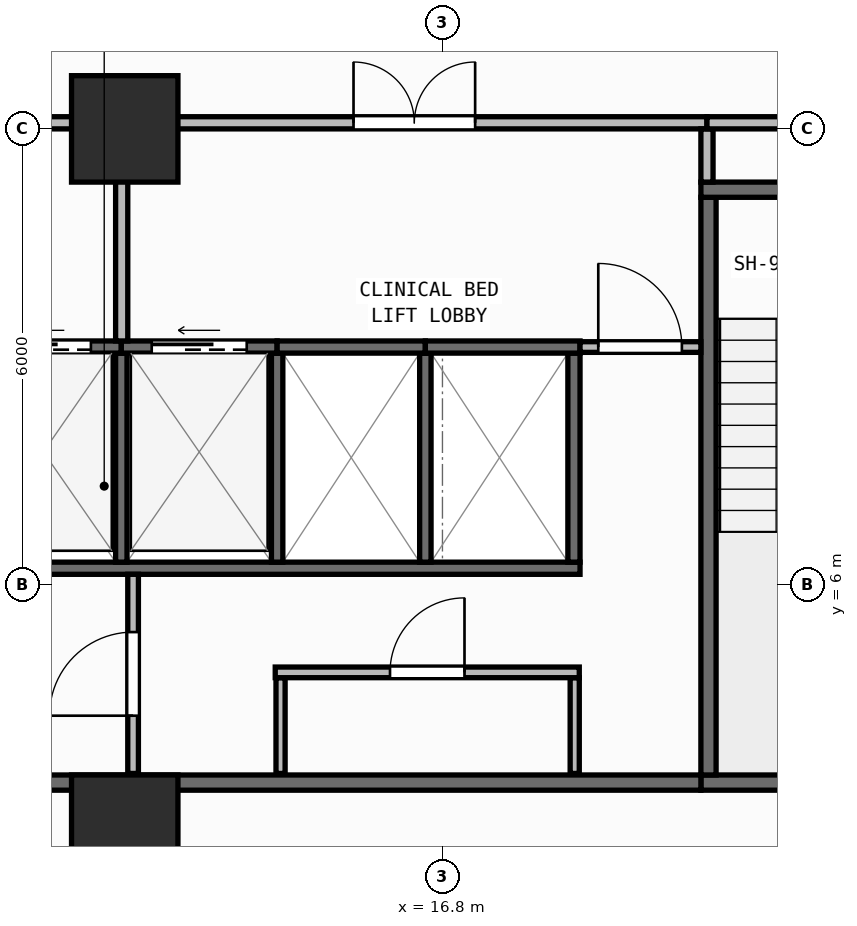
"""IFC4 building model, lengths in metres.
Left out: names, types, materials, properties, quantities, classifications, styles, units other than length and angle.
Written with IfcOpenShell. Run it as: python <this file> out.ifc"""

import sys

from ifc_helpers import new_model, si_unit, direction, frame, frame_2d, origin, origin_2d, place, context, subcontext, project, spatial, rectangle, extrude, element, fill, save


model = new_model("IFC4")
c1 = context("Model", 3, precision=1e-05, world=origin(), true_north=direction((0.0, 1.0)))
c2 = subcontext(c1, "Body", "Model", "MODEL_VIEW")
j1 = project(units=[si_unit("LENGTHUNIT", "METRE"), si_unit("PLANEANGLEUNIT", "RADIAN")], contexts=[c1])
p1 = place(None, origin())
s1 = spatial("IfcSite", under=j1, at=p1, CompositionType="ELEMENT")
p2 = place(p1, origin())
s2 = spatial("IfcBuilding", under=s1, at=p2, CompositionType="ELEMENT")
p3 = place(p2, frame((0.0, 0.0, 81.75)))
s3 = spatial("IfcBuildingStorey", under=s2, at=p3, CompositionType="ELEMENT", Elevation=81.75)
for number, where, z_axis, x_axis in (
    (1, (12.62, 2.8, 0.0), (0.0, 0.0, 1.0), (1.0, 0.0, 0.0)),
    (2, (12.62, 12.0, 0.0), (0.0, 0.0, 1.0), (1.0, 0.0, 0.0)),
):
    element("IfcColumn", number, at=place(p3, frame(where, z_axis=z_axis, x_axis=x_axis)), inside=s3, PredefinedType="COLUMN", context=c2, shape_type="SweptSolid", body=[
        extrude(rectangle(XDim=1.4, YDim=1.4, at=origin_2d()), origin(), (0.0, 0.0, 1.0), 3.95),
    ])
p4 = place(p3, frame((2.76, 0.174, 0.0), z_axis=(0.0, 0.0, 1.0), x_axis=(0.996571478456, 0.082736257641, 0.0)))
e3 = element("IfcWall", 3, at=p4, inside=s3, PredefinedType="STANDARD", context=c2, shape_type="SweptSolid", body=[
    extrude(rectangle(XDim=52.861, YDim=0.26, at=frame_2d((26.431, 0.0))), origin(), (0.0, 0.0, 1.0), 3.71),
])
p5 = place(p4, frame((25.231, 0.0, 0.9)))
e4 = element("IfcOpeningElement", 4, at=p5, cuts=e3, PredefinedType="OPENING", context=c2, shape_type="SweptSolid", body=[
    extrude(rectangle(XDim=2.4, YDim=1.65, at=frame_2d((1.2, 0.825))), frame((0.0, 0.14, 0.0), z_axis=(0.0, -1.0, 0.0), x_axis=(1.0, 0.0, 0.0)), (0.0, 0.0, 1.0), 0.28),
])
p6 = place(p3, frame((20.2, 3.4, 0.0), z_axis=(0.0, 0.0, 1.0), x_axis=(1.0, 0.0, 0.0)))
e5 = element("IfcWall", 5, at=p6, inside=s3, PredefinedType="SHEAR", context=c2, shape_type="SweptSolid", body=[
    extrude(rectangle(XDim=3.7, YDim=0.2, at=frame_2d((1.85, 0.0))), origin(), (0.0, 0.0, 1.0), 3.71),
])
p7 = place(p3, frame((20.3, 3.5, 0.0), z_axis=(0.0, 0.0, 1.0), x_axis=(0.0, 1.0, 0.0)))
e6 = element("IfcWall", 6, at=p7, inside=s3, PredefinedType="SHEAR", context=c2, shape_type="SweptSolid", body=[
    extrude(rectangle(XDim=7.6, YDim=0.2, at=frame_2d((3.8, 0.0))), origin(), (0.0, 0.0, 1.0), 3.71),
])
p8 = place(p3, frame((20.2, 11.2, 0.0), z_axis=(0.0, 0.0, 1.0), x_axis=(1.0, 0.0, 0.0)))
e7 = element("IfcWall", 7, at=p8, inside=s3, PredefinedType="SHEAR", context=c2, shape_type="SweptSolid", body=[
    extrude(rectangle(XDim=3.7, YDim=0.2, at=frame_2d((1.85, 0.0))), origin(), (0.0, 0.0, 1.0), 3.71),
])
p9 = place(p8, frame((1.2, 0.0, 0.0)))
e8 = element("IfcOpeningElement", 8, at=p9, cuts=e7, PredefinedType="OPENING", context=c2, shape_type="SweptSolid", body=[
    extrude(rectangle(XDim=1.3, YDim=2.15, at=frame_2d((0.65, 1.075))), frame((0.0, 0.11, 0.0), z_axis=(0.0, -1.0, 0.0), x_axis=(1.0, 0.0, 0.0)), (0.0, 0.0, 1.0), 0.22),
])
p10 = place(p3, frame((6.5, 3.4, 0.0), z_axis=(0.0, 0.0, 1.0), x_axis=(1.0, 0.0, 0.0)))
e9 = element("IfcWall", 9, at=p10, inside=s3, PredefinedType="SHEAR", context=c2, shape_type="SweptSolid", body=[
    extrude(rectangle(XDim=13.7, YDim=0.2, at=frame_2d((6.85, 0.0))), origin(), (0.0, 0.0, 1.0), 3.71),
])
p11 = place(p3, frame((6.5, 6.22, 0.0), z_axis=(0.0, 0.0, 1.0), x_axis=(1.0, 0.0, 0.0)))
e10 = element("IfcWall", 10, at=p11, inside=s3, PredefinedType="SHEAR", context=c2, shape_type="SweptSolid", body=[
    extrude(rectangle(XDim=12.11, YDim=0.16, at=frame_2d((6.055, 0.0))), origin(), (0.0, 0.0, 1.0), 3.71),
])
p12 = place(p3, frame((18.53, 6.3, 0.0), z_axis=(0.0, 0.0, 1.0), x_axis=(0.0, 1.0, 0.0)))
e11 = element("IfcWall", 11, at=p12, inside=s3, PredefinedType="SHEAR", context=c2, shape_type="SweptSolid", body=[
    extrude(rectangle(XDim=2.75, YDim=0.16, at=frame_2d((1.375, 0.0))), origin(), (0.0, 0.0, 1.0), 3.71),
])
for number, where, z_axis, x_axis in (
    (12, (12.575, 6.3, 0.0), (0.0, 0.0, 1.0), (0.0, 1.0, 0.0)),
    (13, (14.625, 6.3, 0.0), (0.0, 0.0, 1.0), (0.0, 1.0, 0.0)),
    (14, (16.575, 6.3, 0.0), (0.0, 0.0, 1.0), (0.0, 1.0, 0.0)),
):
    element("IfcWall", number, at=place(p3, frame(where, z_axis=z_axis, x_axis=x_axis)), inside=s3, PredefinedType="SHEAR", context=c2, shape_type="SweptSolid", body=[
        extrude(rectangle(XDim=2.75, YDim=0.15, at=frame_2d((1.375, 0.0))), origin(), (0.0, 0.0, 1.0), 3.71),
    ])
p13 = place(p3, frame((10.525, 9.13, 0.0), z_axis=(0.0, 0.0, 1.0), x_axis=(1.0, 0.0, 0.0)))
e15 = element("IfcWall", 15, at=p13, inside=s3, PredefinedType="SHEAR", context=c2, shape_type="SweptSolid", body=[
    extrude(rectangle(XDim=2.05, YDim=0.16, at=frame_2d((1.025, 0.0))), origin(), (0.0, 0.0, 1.0), 3.71),
])
p14 = place(p13, frame((0.4, 0.0, 0.0)))
e16 = element("IfcOpeningElement", 16, at=p14, cuts=e15, PredefinedType="OPENING", context=c2, shape_type="SweptSolid", body=[
    extrude(rectangle(XDim=1.25, YDim=2.15, at=frame_2d((0.625, 1.075))), frame((0.0, 0.09, 0.0), z_axis=(0.0, -1.0, 0.0), x_axis=(1.0, 0.0, 0.0)), (0.0, 0.0, 1.0), 0.18),
])
p15 = place(p3, frame((12.575, 9.13, 0.0), z_axis=(0.0, 0.0, 1.0), x_axis=(1.0, 0.0, 0.0)))
e17 = element("IfcWall", 17, at=p15, inside=s3, PredefinedType="SHEAR", context=c2, shape_type="SweptSolid", body=[
    extrude(rectangle(XDim=2.05, YDim=0.16, at=frame_2d((1.025, 0.0))), origin(), (0.0, 0.0, 1.0), 3.71),
])
p16 = place(p15, frame((0.4, 0.0, 0.0)))
e18 = element("IfcOpeningElement", 18, at=p16, cuts=e17, PredefinedType="OPENING", context=c2, shape_type="SweptSolid", body=[
    extrude(rectangle(XDim=1.25, YDim=2.15, at=frame_2d((0.625, 1.075))), frame((0.0, 0.09, 0.0), z_axis=(0.0, -1.0, 0.0), x_axis=(1.0, 0.0, 0.0)), (0.0, 0.0, 1.0), 0.18),
])
p17 = place(p3, frame((14.625, 9.13, 0.0), z_axis=(0.0, 0.0, 1.0), x_axis=(1.0, 0.0, 0.0)))
e19 = element("IfcWall", 19, at=p17, inside=s3, PredefinedType="SHEAR", context=c2, shape_type="SweptSolid", body=[
    extrude(rectangle(XDim=1.95, YDim=0.16, at=frame_2d((0.975, 0.0))), origin(), (0.0, 0.0, 1.0), 3.71),
])
p18 = place(p3, frame((16.575, 9.13, 0.0), z_axis=(0.0, 0.0, 1.0), x_axis=(1.0, 0.0, 0.0)))
e20 = element("IfcWall", 20, at=p18, inside=s3, PredefinedType="SHEAR", context=c2, shape_type="SweptSolid", body=[
    extrude(rectangle(XDim=2.035, YDim=0.16, at=frame_2d((1.018, 0.0))), origin(), (0.0, 0.0, 1.0), 3.71),
])
p19 = place(p3, frame((12.73, 3.52, 0.0), z_axis=(0.0, 0.0, 1.0), x_axis=(0.0, 1.0, 0.0)))
e21 = element("IfcWall", 21, at=p19, inside=s3, PredefinedType="PARTITIONING", context=c2, shape_type="SweptSolid", body=[
    extrude(rectangle(XDim=2.62, YDim=0.14, at=frame_2d((1.31, 0.0))), origin(), (0.0, 0.0, 1.0), 3.71),
])
p20 = place(p19, frame((0.76, 0.0, 0.0)))
e22 = element("IfcOpeningElement", 22, at=p20, cuts=e21, PredefinedType="OPENING", context=c2, shape_type="SweptSolid", body=[
    extrude(rectangle(XDim=1.1, YDim=2.1, at=frame_2d((0.55, 1.05))), frame((0.0, 0.08, 0.0), z_axis=(0.0, -1.0, 0.0), x_axis=(1.0, 0.0, 0.0)), (0.0, 0.0, 1.0), 0.16),
])
for number, where, z_axis, x_axis in (
    (23, (14.67, 3.52, 0.0), (0.0, 0.0, 1.0), (0.0, 1.0, 0.0)),
    (24, (18.54, 3.52, 0.0), (0.0, 0.0, 1.0), (0.0, 1.0, 0.0)),
):
    element("IfcWall", number, at=place(p3, frame(where, z_axis=z_axis, x_axis=x_axis)), inside=s3, PredefinedType="PARTITIONING", context=c2, shape_type="SweptSolid", body=[
        extrude(rectangle(XDim=1.26, YDim=0.12, at=frame_2d((0.63, 0.0))), origin(), (0.0, 0.0, 1.0), 3.71),
    ])
p21 = place(p3, frame((14.6, 4.85, 0.0), z_axis=(0.0, 0.0, 1.0), x_axis=(1.0, 0.0, 0.0)))
e25 = element("IfcWall", 25, at=p21, inside=s3, PredefinedType="PARTITIONING", context=c2, shape_type="SweptSolid", body=[
    extrude(rectangle(XDim=4.0, YDim=0.14, at=frame_2d((2.0, 0.0))), origin(), (0.0, 0.0, 1.0), 3.71),
])
p22 = place(p21, frame((1.51, 0.0, 0.0)))
e26 = element("IfcOpeningElement", 26, at=p22, cuts=e25, PredefinedType="OPENING", context=c2, shape_type="SweptSolid", body=[
    extrude(rectangle(XDim=0.98, YDim=2.1, at=frame_2d((0.49, 1.05))), frame((0.0, 0.08, 0.0), z_axis=(0.0, -1.0, 0.0), x_axis=(1.0, 0.0, 0.0)), (0.0, 0.0, 1.0), 0.16),
])
p23 = place(p3, frame((18.61, 9.13, 0.0), z_axis=(0.0, 0.0, 1.0), x_axis=(1.0, 0.0, 0.0)))
e27 = element("IfcWall", 27, at=p23, inside=s3, PredefinedType="PARTITIONING", context=c2, shape_type="SweptSolid", body=[
    extrude(rectangle(XDim=1.59, YDim=0.14, at=frame_2d((0.795, 0.0))), origin(), (0.0, 0.0, 1.0), 3.71),
])
p24 = place(p23, frame((0.24, 0.0, 0.0)))
e28 = element("IfcOpeningElement", 28, at=p24, cuts=e27, PredefinedType="OPENING", context=c2, shape_type="SweptSolid", body=[
    extrude(rectangle(XDim=1.1, YDim=2.1, at=frame_2d((0.55, 1.05))), frame((0.0, 0.08, 0.0), z_axis=(0.0, -1.0, 0.0), x_axis=(1.0, 0.0, 0.0)), (0.0, 0.0, 1.0), 0.16),
])
p25 = place(p3, frame((6.4, 12.08, 0.0), z_axis=(0.0, 0.0, 1.0), x_axis=(1.0, 0.0, 0.0)))
e29 = element("IfcWall", 29, at=p25, inside=s3, PredefinedType="PARTITIONING", context=c2, shape_type="SweptSolid", body=[
    extrude(rectangle(XDim=6.18, YDim=0.16, at=frame_2d((3.09, 0.0))), origin(), (0.0, 0.0, 1.0), 3.073),
])
p26 = place(p25, frame((2.29, 0.0, 0.0)))
e30 = element("IfcOpeningElement", 30, at=p26, cuts=e29, PredefinedType="OPENING", context=c2, shape_type="SweptSolid", body=[
    extrude(rectangle(XDim=1.6, YDim=2.05, at=frame_2d((0.8, 1.025))), frame((0.0, 0.09, 0.0), z_axis=(0.0, -1.0, 0.0), x_axis=(1.0, 0.0, 0.0)), (0.0, 0.0, 1.0), 0.18),
])
p27 = place(p3, frame((12.58, 9.21, 0.0), z_axis=(0.0, 0.0, 1.0), x_axis=(0.0, 1.0, 0.0)))
e31 = element("IfcWall", 31, at=p27, inside=s3, PredefinedType="PARTITIONING", context=c2, shape_type="SweptSolid", body=[
    extrude(rectangle(XDim=2.79, YDim=0.16, at=frame_2d((1.395, 0.0))), origin(), (0.0, 0.0, 1.0), 3.71),
])
p28 = place(p3, frame((12.58, 12.08, 0.0), z_axis=(0.0, 0.0, 1.0), x_axis=(1.0, 0.0, 0.0)))
e32 = element("IfcWall", 32, at=p28, inside=s3, PredefinedType="PARTITIONING", context=c2, shape_type="SweptSolid", body=[
    extrude(rectangle(XDim=7.7, YDim=0.16, at=frame_2d((3.85, 0.0))), origin(), (0.0, 0.0, 1.0), 3.073),
])
p29 = place(p28, frame((3.05, 0.0, 0.0)))
e33 = element("IfcOpeningElement", 33, at=p29, cuts=e32, PredefinedType="OPENING", context=c2, shape_type="SweptSolid", body=[
    extrude(rectangle(XDim=1.6, YDim=2.05, at=frame_2d((0.8, 1.025))), frame((0.0, 0.09, 0.0), z_axis=(0.0, -1.0, 0.0), x_axis=(1.0, 0.0, 0.0)), (0.0, 0.0, 1.0), 0.18),
])
p30 = place(p3, frame((20.28, 11.3, 0.0), z_axis=(0.0, 0.0, 1.0), x_axis=(0.0, 1.0, 0.0)))
e34 = element("IfcWall", 34, at=p30, inside=s3, PredefinedType="PARTITIONING", context=c2, shape_type="SweptSolid", body=[
    extrude(rectangle(XDim=0.7, YDim=0.16, at=frame_2d((0.35, 0.0))), origin(), (0.0, 0.0, 1.0), 3.71),
])
p31 = place(p3, frame((20.28, 12.08, 0.0), z_axis=(0.0, 0.0, 1.0), x_axis=(1.0, 0.0, 0.0)))
e35 = element("IfcWall", 35, at=p31, inside=s3, PredefinedType="PARTITIONING", context=c2, shape_type="SweptSolid", body=[
    extrude(rectangle(XDim=3.62, YDim=0.16, at=frame_2d((1.81, 0.0))), origin(), (0.0, 0.0, 1.0), 3.073),
])
p32 = place(p31, frame((1.01, 0.0, 0.0)))
e36 = element("IfcOpeningElement", 36, at=p32, cuts=e35, PredefinedType="OPENING", context=c2, shape_type="SweptSolid", body=[
    extrude(rectangle(XDim=1.6, YDim=2.05, at=frame_2d((0.8, 1.025))), frame((0.0, 0.09, 0.0), z_axis=(0.0, -1.0, 0.0), x_axis=(1.0, 0.0, 0.0)), (0.0, 0.0, 1.0), 0.18),
])
p33 = place(p14, origin())
e37 = element("IfcDoor", 37, at=p33, inside=s3, OperationType="SLIDING_TO_LEFT", PredefinedType="DOOR", context=c2, shape_type="SweptSolid", body=[
    extrude(rectangle(XDim=1.25, YDim=2.15, at=frame_2d((0.625, 1.075))), frame((0.0, 0.025, 0.0), z_axis=(0.0, -1.0, 0.0), x_axis=(1.0, 0.0, 0.0)), (0.0, 0.0, 1.0), 0.05),
])
fill(e16, e37)
p34 = place(p16, origin())
e38 = element("IfcDoor", 38, at=p34, inside=s3, OperationType="SLIDING_TO_LEFT", PredefinedType="DOOR", context=c2, shape_type="SweptSolid", body=[
    extrude(rectangle(XDim=1.25, YDim=2.15, at=frame_2d((0.625, 1.075))), frame((0.0, 0.025, 0.0), z_axis=(0.0, -1.0, 0.0), x_axis=(1.0, 0.0, 0.0)), (0.0, 0.0, 1.0), 0.05),
])
fill(e18, e38)
p35 = place(p20, origin())
e39 = element("IfcDoor", 39, at=p35, inside=s3, OperationType="SINGLE_SWING_LEFT", PredefinedType="DOOR", context=c2, shape_type="SweptSolid", body=[
    extrude(rectangle(XDim=1.1, YDim=2.1, at=frame_2d((0.55, 1.05))), frame((0.0, 0.025, 0.0), z_axis=(0.0, -1.0, 0.0), x_axis=(1.0, 0.0, 0.0)), (0.0, 0.0, 1.0), 0.05),
])
fill(e22, e39)
p36 = place(p22, origin())
e40 = element("IfcDoor", 40, at=p36, inside=s3, OperationType="SINGLE_SWING_RIGHT", PredefinedType="DOOR", context=c2, shape_type="SweptSolid", body=[
    extrude(rectangle(XDim=0.98, YDim=2.1, at=frame_2d((0.49, 1.05))), frame((0.0, 0.025, 0.0), z_axis=(0.0, -1.0, 0.0), x_axis=(1.0, 0.0, 0.0)), (0.0, 0.0, 1.0), 0.05),
])
fill(e26, e40)
p37 = place(p24, origin())
e41 = element("IfcDoor", 41, at=p37, inside=s3, OperationType="SINGLE_SWING_LEFT", PredefinedType="DOOR", context=c2, shape_type="SweptSolid", body=[
    extrude(rectangle(XDim=1.1, YDim=2.1, at=frame_2d((0.55, 1.05))), frame((0.0, 0.025, 0.0), z_axis=(0.0, -1.0, 0.0), x_axis=(1.0, 0.0, 0.0)), (0.0, 0.0, 1.0), 0.05),
])
fill(e28, e41)
p38 = place(p29, origin())
e42 = element("IfcDoor", 42, at=p38, inside=s3, OperationType="DOUBLE_DOOR_SINGLE_SWING", PredefinedType="DOOR", context=c2, shape_type="SweptSolid", body=[
    extrude(rectangle(XDim=1.6, YDim=2.05, at=frame_2d((0.8, 1.025))), frame((0.0, 0.025, 0.0), z_axis=(0.0, -1.0, 0.0), x_axis=(1.0, 0.0, 0.0)), (0.0, 0.0, 1.0), 0.05),
])
fill(e33, e42)
save(model, sys.argv[1])
